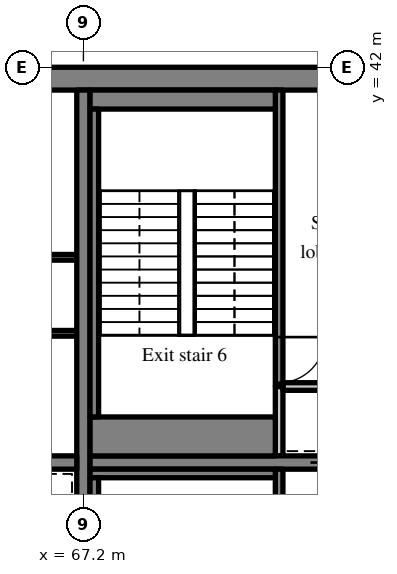
"""IFC4 building model, lengths in metres.
Left out: names, types, materials, properties, quantities, classifications, styles, units other than length and angle.
Written with IfcOpenShell. Run it as: python <this file> out.ifc"""

import sys

from ifc_helpers import new_model, si_unit, direction, frame, frame_2d, origin, place, context, subcontext, project, spatial, rectangle, extrude, source, transform, mapped, element, fill, save


model = new_model("IFC4")
c1 = context("Model", 3, precision=1e-05, world=origin(), true_north=direction((0.0, 1.0)))
c2 = subcontext(c1, "Body", "Model", "MODEL_VIEW")
j1 = project(units=[si_unit("LENGTHUNIT", "METRE"), si_unit("PLANEANGLEUNIT", "RADIAN")], contexts=[c1])
p1 = place(None, origin())
s1 = spatial("IfcSite", under=j1, at=p1, CompositionType="ELEMENT")
p2 = place(p1, origin())
s2 = spatial("IfcBuilding", under=s1, at=p2, CompositionType="ELEMENT")
p3 = place(p2, frame((0.0, 0.0, 221.8)))
s3 = spatial("IfcBuildingStorey", under=s2, at=p3, CompositionType="ELEMENT", Elevation=221.8)
m1 = source(origin(), c2, "Body", "SweptSolid", [
    extrude(rectangle(XDim=50.4, YDim=0.6, at=frame_2d((25.2, 0.0))), origin(), (0.0, 0.0, 1.0), 3.62),
])
p4 = place(p3, frame((25.2, 41.7, 0.0), z_axis=(0.0, 0.0, 1.0), x_axis=(1.0, 0.0, 0.0)))
e1 = element("IfcWall", 1, at=p4, inside=s3, PredefinedType="SHEAR", context=c2, shape_type="MappedRepresentation", body=[
    mapped(m1, transform((0.0, 0.0, 0.0), scale=1.0)),
])
m2 = source(origin(), c2, "Body", "SweptSolid", [
    extrude(rectangle(XDim=18.8, YDim=0.35, at=frame_2d((9.4, 0.0))), origin(), (0.0, 0.0, 1.0), 3.62),
])
p5 = place(p3, frame((67.2, 22.6, 0.0), z_axis=(0.0, 0.0, 1.0), x_axis=(0.0, 1.0, 0.0)))
e2 = element("IfcWall", 2, at=p5, inside=s3, PredefinedType="SHEAR", context=c2, shape_type="MappedRepresentation", body=[
    mapped(m2, transform((0.0, 0.0, 0.0), scale=1.0)),
])
m3 = source(origin(), c2, "Body", "SweptSolid", [
    extrude(rectangle(XDim=16.45, YDim=0.35, at=frame_2d((8.225, 0.0))), origin(), (0.0, 0.0, 1.0), 3.62),
])
p6 = place(p3, frame((50.575, 31.6, 0.0), z_axis=(0.0, 0.0, 1.0), x_axis=(1.0, 0.0, 0.0)))
e3 = element("IfcWall", 3, at=p6, inside=s3, PredefinedType="SHEAR", context=c2, shape_type="MappedRepresentation", body=[
    mapped(m3, transform((0.0, 0.0, 0.0), scale=1.0)),
])
m4 = source(origin(), c2, "Body", "SweptSolid", [
    extrude(rectangle(XDim=1.0, YDim=2.1, at=frame_2d((0.5, 1.05))), frame((0.0, 0.185, 0.0), z_axis=(0.0, -1.0, 0.0), x_axis=(1.0, 0.0, 0.0)), (0.0, 0.0, 1.0), 0.37),
])
p7 = place(p6, frame((0.613, 0.0, 0.0)))
e4 = element("IfcOpeningElement", 4, at=p7, cuts=e3, PredefinedType="OPENING", context=c2, shape_type="MappedRepresentation", body=[
    mapped(m4, transform((0.0, 0.0, 0.0), scale=1.0)),
])
m5 = source(origin(), c2, "Body", "SweptSolid", [
    extrude(rectangle(XDim=7.625, YDim=0.35, at=frame_2d((3.812, 0.0))), origin(), (0.0, 0.0, 1.0), 3.62),
])
p8 = place(p3, frame((67.375, 31.6, 0.0), z_axis=(0.0, 0.0, 1.0), x_axis=(1.0, 0.0, 0.0)))
e5 = element("IfcWall", 5, at=p8, inside=s3, PredefinedType="SHEAR", context=c2, shape_type="MappedRepresentation", body=[
    mapped(m5, transform((0.0, 0.0, 0.0), scale=1.0)),
])
m6 = source(origin(), c2, "Body", "SweptSolid", [
    extrude(rectangle(XDim=1.1, YDim=2.1, at=frame_2d((0.55, 1.05))), frame((0.0, 0.185, 0.0), z_axis=(0.0, -1.0, 0.0), x_axis=(1.0, 0.0, 0.0)), (0.0, 0.0, 1.0), 0.37),
])
p9 = place(p8, frame((5.8, 0.0, 0.0)))
e6 = element("IfcOpeningElement", 6, at=p9, cuts=e5, PredefinedType="OPENING", context=c2, shape_type="MappedRepresentation", body=[
    mapped(m6, transform((0.0, 0.0, 0.0), scale=1.0)),
])
m7 = source(origin(), c2, "Body", "SweptSolid", [
    extrude(rectangle(XDim=14.225, YDim=0.15, at=frame_2d((7.112, 0.0))), origin(), (0.0, 0.0, 1.0), 3.62),
])
p10 = place(p3, frame((67.025, 35.0, 0.0), z_axis=(0.0, 0.0, 1.0), x_axis=(-1.0, 0.0, 0.0)))
e7 = element("IfcWall", 7, at=p10, inside=s3, PredefinedType="PARTITIONING", context=c2, shape_type="MappedRepresentation", body=[
    mapped(m7, transform((0.0, 0.0, 0.0), scale=1.0)),
])
m8 = source(origin(), c2, "Body", "SweptSolid", [
    extrude(rectangle(XDim=0.9, YDim=2.1, at=frame_2d((0.45, 1.05))), frame((0.0, 0.085, 0.0), z_axis=(0.0, -1.0, 0.0), x_axis=(1.0, 0.0, 0.0)), (0.0, 0.0, 1.0), 0.17),
])
p11 = place(p10, frame((0.965, 0.0, 0.0)))
e8 = element("IfcOpeningElement", 8, at=p11, cuts=e7, PredefinedType="OPENING", context=c2, shape_type="MappedRepresentation", body=[
    mapped(m8, transform((0.0, 0.0, 0.0), scale=1.0)),
])
p12 = place(p10, frame((5.918, 0.0, 0.0)))
e9 = element("IfcOpeningElement", 9, at=p12, cuts=e7, PredefinedType="OPENING", context=c2, shape_type="MappedRepresentation", body=[
    mapped(m8, transform((0.0, 0.0, 0.0), scale=1.0)),
])
p13 = place(p10, frame((11.577, 0.0, 0.0)))
e10 = element("IfcOpeningElement", 10, at=p13, cuts=e7, PredefinedType="OPENING", context=c2, shape_type="MappedRepresentation", body=[
    mapped(m8, transform((0.0, 0.0, 0.0), scale=1.0)),
])
m9 = source(origin(), c2, "Body", "SweptSolid", [
    extrude(rectangle(XDim=16.45, YDim=0.15, at=frame_2d((8.225, 0.0))), origin(), (0.0, 0.0, 1.0), 3.62),
])
p14 = place(p3, frame((67.025, 37.0, 0.0), z_axis=(0.0, 0.0, 1.0), x_axis=(-1.0, 0.0, 0.0)))
e11 = element("IfcWall", 11, at=p14, inside=s3, PredefinedType="PARTITIONING", context=c2, shape_type="MappedRepresentation", body=[
    mapped(m9, transform((0.0, 0.0, 0.0), scale=1.0)),
])
p15 = place(p14, frame((0.784, 0.0, 0.0)))
e12 = element("IfcOpeningElement", 12, at=p15, cuts=e11, PredefinedType="OPENING", context=c2, shape_type="MappedRepresentation", body=[
    mapped(m8, transform((0.0, 0.0, 0.0), scale=1.0)),
])
p16 = place(p14, frame((3.663, 0.0, 0.0)))
e13 = element("IfcOpeningElement", 13, at=p16, cuts=e11, PredefinedType="OPENING", context=c2, shape_type="MappedRepresentation", body=[
    mapped(m8, transform((0.0, 0.0, 0.0), scale=1.0)),
])
p17 = place(p14, frame((9.42, 0.0, 0.0)))
e14 = element("IfcOpeningElement", 14, at=p17, cuts=e11, PredefinedType="OPENING", context=c2, shape_type="MappedRepresentation", body=[
    mapped(m8, transform((0.0, 0.0, 0.0), scale=1.0)),
])
p18 = place(p14, frame((14.766, 0.0, 0.0)))
e15 = element("IfcOpeningElement", 15, at=p18, cuts=e11, PredefinedType="OPENING", context=c2, shape_type="MappedRepresentation", body=[
    mapped(m8, transform((0.0, 0.0, 0.0), scale=1.0)),
])
m10 = source(origin(), c2, "Body", "SweptSolid", [
    extrude(rectangle(XDim=8.825, YDim=0.2, at=frame_2d((4.413, 0.0))), origin(), (0.0, 0.0, 1.0), 3.62),
])
p19 = place(p3, frame((72.35, 22.6, 0.0), z_axis=(0.0, 0.0, 1.0), x_axis=(0.0, 1.0, 0.0)))
e16 = element("IfcWall", 16, at=p19, inside=s3, PredefinedType="SOLIDWALL", context=c2, shape_type="MappedRepresentation", body=[
    mapped(m10, transform((0.0, 0.0, 0.0), scale=1.0)),
])
m11 = source(origin(), c2, "Body", "SweptSolid", [
    extrude(rectangle(XDim=1.2, YDim=2.1, at=frame_2d((0.6, 1.05))), frame((0.0, 0.11, 0.0), z_axis=(0.0, -1.0, 0.0), x_axis=(1.0, 0.0, 0.0)), (0.0, 0.0, 1.0), 0.22),
])
p20 = place(p19, frame((1.0, 0.0, 0.0)))
e17 = element("IfcOpeningElement", 17, at=p20, cuts=e16, PredefinedType="OPENING", context=c2, shape_type="MappedRepresentation", body=[
    mapped(m11, transform((0.0, 0.0, 0.0), scale=1.0)),
])
m12 = source(origin(), c2, "Body", "SweptSolid", [
    extrude(rectangle(XDim=1.825, YDim=0.2, at=frame_2d((0.913, 0.0))), origin(), (0.0, 0.0, 1.0), 3.62),
])
p21 = place(p3, frame((72.35, 31.775, 0.0), z_axis=(0.0, 0.0, 1.0), x_axis=(0.0, 1.0, 0.0)))
e18 = element("IfcWall", 18, at=p21, inside=s3, PredefinedType="SOLIDWALL", context=c2, shape_type="MappedRepresentation", body=[
    mapped(m12, transform((0.0, 0.0, 0.0), scale=1.0)),
])
m13 = source(origin(), c2, "Body", "SweptSolid", [
    extrude(rectangle(XDim=2.55, YDim=0.2, at=frame_2d((1.275, 0.0))), origin(), (0.0, 0.0, 1.0), 3.62),
])
p22 = place(p3, frame((72.45, 33.6, 0.0), z_axis=(0.0, 0.0, 1.0), x_axis=(1.0, 0.0, 0.0)))
e19 = element("IfcWall", 19, at=p22, inside=s3, PredefinedType="SOLIDWALL", context=c2, shape_type="MappedRepresentation", body=[
    mapped(m13, transform((0.0, 0.0, 0.0), scale=1.0)),
])
m14 = source(origin(), c2, "Body", "SweptSolid", [
    extrude(rectangle(XDim=7.8, YDim=0.2, at=frame_2d((3.9, 0.0))), origin(), (0.0, 0.0, 1.0), 3.62),
])
p23 = place(p3, frame((72.35, 33.6, 0.0), z_axis=(0.0, 0.0, 1.0), x_axis=(0.0, 1.0, 0.0)))
e20 = element("IfcWall", 20, at=p23, inside=s3, PredefinedType="SOLIDWALL", context=c2, shape_type="MappedRepresentation", body=[
    mapped(m14, transform((0.0, 0.0, 0.0), scale=1.0)),
])
p24 = place(p23, frame((0.1, 0.0, 0.0)))
e21 = element("IfcOpeningElement", 21, at=p24, cuts=e20, PredefinedType="OPENING", context=c2, shape_type="MappedRepresentation", body=[
    mapped(m11, transform((0.0, 0.0, 0.0), scale=1.0)),
])
m15 = source(origin(), c2, "Body", "SweptSolid", [
    extrude(rectangle(XDim=4.875, YDim=0.225, at=frame_2d((2.438, 0.0))), origin(), (0.0, 0.0, 1.0), 3.62),
])
p25 = place(p3, frame((67.375, 31.312, 0.0), z_axis=(0.0, 0.0, 1.0), x_axis=(1.0, 0.0, 0.0)))
e22 = element("IfcWall", 22, at=p25, inside=s3, PredefinedType="SOLIDWALL", context=c2, shape_type="MappedRepresentation", body=[
    mapped(m15, transform((0.0, 0.0, 0.0), scale=1.0)),
])
m16 = source(origin(), c2, "Body", "SweptSolid", [
    extrude(rectangle(XDim=8.1, YDim=0.225, at=frame_2d((4.05, 0.0))), origin(), (0.0, 0.0, 1.0), 3.62),
])
p26 = place(p3, frame((67.487, 23.1, 0.0), z_axis=(0.0, 0.0, 1.0), x_axis=(0.0, 1.0, 0.0)))
e23 = element("IfcWall", 23, at=p26, inside=s3, PredefinedType="SOLIDWALL", context=c2, shape_type="MappedRepresentation", body=[
    mapped(m16, transform((0.0, 0.0, 0.0), scale=1.0)),
])
m17 = source(origin(), c2, "Body", "SweptSolid", [
    extrude(rectangle(XDim=4.875, YDim=0.5, at=frame_2d((2.438, 0.0))), origin(), (0.0, 0.0, 1.0), 3.62),
])
p27 = place(p3, frame((67.375, 41.15, 0.0), z_axis=(0.0, 0.0, 1.0), x_axis=(1.0, 0.0, 0.0)))
e24 = element("IfcWall", 24, at=p27, inside=s3, PredefinedType="SOLIDWALL", context=c2, shape_type="MappedRepresentation", body=[
    mapped(m17, transform((0.0, 0.0, 0.0), scale=1.0)),
])
m18 = source(origin(), c2, "Body", "SweptSolid", [
    extrude(rectangle(XDim=4.875, YDim=1.025, at=frame_2d((2.438, 0.0))), origin(), (0.0, 0.0, 1.0), 3.62),
])
p28 = place(p3, frame((67.375, 32.287, 0.0), z_axis=(0.0, 0.0, 1.0), x_axis=(1.0, 0.0, 0.0)))
e25 = element("IfcWall", 25, at=p28, inside=s3, PredefinedType="SOLIDWALL", context=c2, shape_type="MappedRepresentation", body=[
    mapped(m18, transform((0.0, 0.0, 0.0), scale=1.0)),
])
p29 = place(p3, frame((67.487, 32.8, 0.0), z_axis=(0.0, 0.0, 1.0), x_axis=(0.0, 1.0, 0.0)))
e26 = element("IfcWall", 26, at=p29, inside=s3, PredefinedType="SOLIDWALL", context=c2, shape_type="MappedRepresentation", body=[
    mapped(m16, transform((0.0, 0.0, 0.0), scale=1.0)),
])
m19 = source(origin(), c2, "Body", "SweptSolid", [
    extrude(rectangle(XDim=1.1, YDim=2.1, at=frame_2d((0.55, 1.05))), frame((0.0, 0.025, 0.0), z_axis=(0.0, -1.0, 0.0), x_axis=(1.0, 0.0, 0.0)), (0.0, 0.0, 1.0), 0.05),
])
p30 = place(p9, origin())
e27 = element("IfcDoor", 27, at=p30, inside=s3, OperationType="SLIDING_TO_LEFT", PredefinedType="DOOR", context=c2, shape_type="MappedRepresentation", body=[
    mapped(m19, transform((0.0, 0.0, 0.0), scale=1.0)),
])
fill(e6, e27)
m20 = source(origin(), c2, "Body", "SweptSolid", [
    extrude(rectangle(XDim=1.2, YDim=2.1, at=frame_2d((0.6, 1.05))), frame((0.0, 0.025, 0.0), z_axis=(0.0, -1.0, 0.0), x_axis=(1.0, 0.0, 0.0)), (0.0, 0.0, 1.0), 0.05),
])
p31 = place(p24, origin())
e28 = element("IfcDoor", 28, at=p31, inside=s3, OperationType="SINGLE_SWING_RIGHT", PredefinedType="DOOR", context=c2, shape_type="MappedRepresentation", body=[
    mapped(m20, transform((0.0, 0.0, 0.0), scale=1.0)),
])
fill(e21, e28)
save(model, sys.argv[1])
